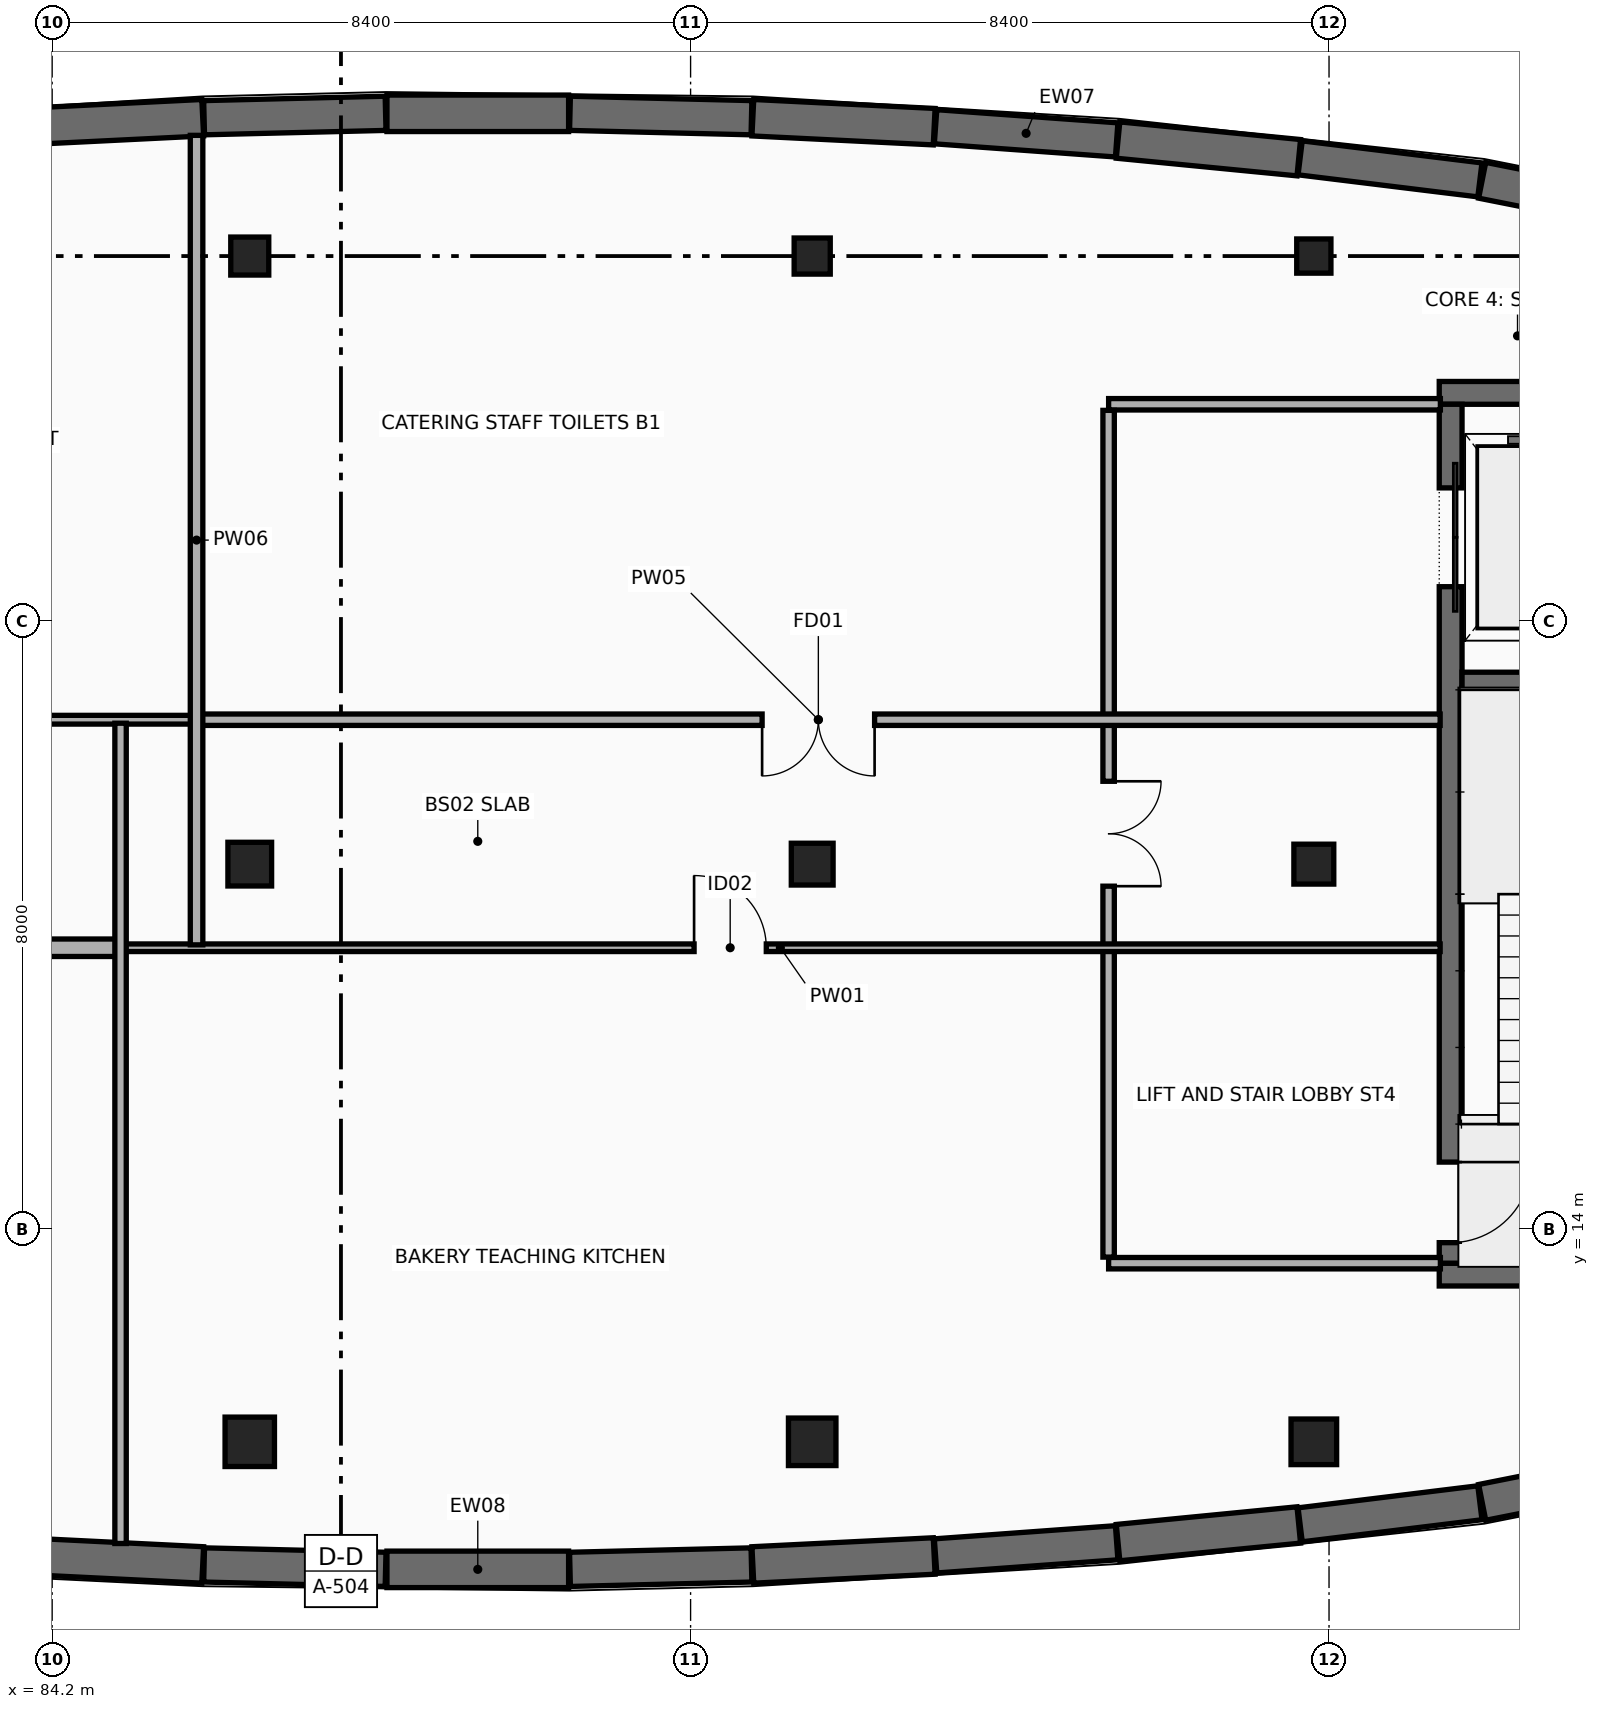
"""IFC4 building model, lengths in metres.
Left out: names, types, materials, properties, quantities, classifications, styles, units other than length and angle.
Written with IfcOpenShell. Run it as: python <this file> out.ifc"""

import sys

from ifc_helpers import new_model, si_unit, direction, frame, frame_2d, origin, origin_2d, place, context, subcontext, project, spatial, rectangle, extrude, element, fill, save


model = new_model("IFC4")
c1 = context("Model", 3, precision=1e-05, world=origin(), true_north=direction((0.0, 1.0)))
c2 = subcontext(c1, "Body", "Model", "MODEL_VIEW")
j1 = project(units=[si_unit("LENGTHUNIT", "METRE"), si_unit("PLANEANGLEUNIT", "RADIAN")], contexts=[c1])
p1 = place(None, origin())
s1 = spatial("IfcSite", under=j1, at=p1, CompositionType="ELEMENT")
p2 = place(p1, origin())
s2 = spatial("IfcBuilding", under=s1, at=p2, CompositionType="ELEMENT")
p3 = place(p2, frame((0.0, 0.0, -4.2)))
s3 = spatial("IfcBuildingStorey", under=s2, at=p3, CompositionType="ELEMENT", Elevation=-4.2)
p4 = place(p3, frame((102.45, 13.4, -0.415), z_axis=(0.0, 0.0, 1.0), x_axis=(1.0, 0.0, 0.0)))
e1 = element("IfcWall", 1, at=p4, inside=s3, PredefinedType="SHEAR", context=c2, shape_type="SweptSolid", body=[
    extrude(rectangle(XDim=5.091, YDim=0.3, at=frame_2d((2.545, 0.0))), origin(), (0.0, 0.0, 1.0), 4.615),
])
p5 = place(p3, frame((107.407, 25.0, -0.415), z_axis=(0.0, 0.0, 1.0), x_axis=(-1.0, 0.0, 0.0)))
e2 = element("IfcWall", 2, at=p5, inside=s3, PredefinedType="SHEAR", context=c2, shape_type="SweptSolid", body=[
    extrude(rectangle(XDim=4.957, YDim=0.3, at=frame_2d((2.479, 0.0))), origin(), (0.0, 0.0, 1.0), 4.615),
])
p6 = place(p3, frame((102.6, 24.85, -0.415), z_axis=(0.0, 0.0, 1.0), x_axis=(0.0, -1.0, 0.0)))
e3 = element("IfcWall", 3, at=p6, inside=s3, PredefinedType="SHEAR", context=c2, shape_type="SweptSolid", body=[
    extrude(rectangle(XDim=11.3, YDim=0.3, at=frame_2d((5.65, 0.0))), origin(), (0.0, 0.0, 1.0), 4.615),
])
p7 = place(p6, frame((1.1, 0.0, 0.415)))
e4 = element("IfcOpeningElement", 4, at=p7, cuts=e3, PredefinedType="OPENING", context=c2, shape_type="SweptSolid", body=[
    extrude(rectangle(XDim=1.3, YDim=2.25, at=frame_2d((0.65, 1.125))), frame((0.0, 0.16, 0.0), z_axis=(0.0, -1.0, 0.0), x_axis=(1.0, 0.0, 0.0)), (0.0, 0.0, 1.0), 0.32),
])
p8 = place(p6, frame((9.97, 0.0, 0.415)))
e5 = element("IfcOpeningElement", 5, at=p8, cuts=e3, PredefinedType="OPENING", context=c2, shape_type="SweptSolid", body=[
    extrude(rectangle(XDim=1.06, YDim=2.15, at=frame_2d((0.53, 1.075))), frame((0.0, 0.16, 0.0), z_axis=(0.0, -1.0, 0.0), x_axis=(1.0, 0.0, 0.0)), (0.0, 0.0, 1.0), 0.32),
])
p9 = place(p3, frame((102.75, 21.2, -0.415), z_axis=(0.0, 0.0, 1.0), x_axis=(1.0, 0.0, 0.0)))
e6 = element("IfcWall", 6, at=p9, inside=s3, PredefinedType="SHEAR", context=c2, shape_type="SweptSolid", body=[
    extrude(rectangle(XDim=4.1, YDim=0.25, at=frame_2d((2.05, 0.0))), origin(), (0.0, 0.0, 1.0), 4.615),
])
p10 = place(p3, frame((86.8, 11.2, -0.415), z_axis=(0.0, 0.0, 1.0), x_axis=(1.0, 0.0, 0.0)))
e7 = element("IfcColumn", 7, at=p10, inside=s3, PredefinedType="COLUMN", context=c2, shape_type="SweptSolid", body=[
    extrude(rectangle(XDim=0.65, YDim=0.65, at=origin_2d()), origin(), (0.0, 0.0, 1.0), 4.615),
])
p11 = place(p3, frame((86.8, 18.8, -0.415), z_axis=(0.0, 0.0, 1.0), x_axis=(1.0, 0.0, 0.0)))
e8 = element("IfcColumn", 8, at=p11, inside=s3, PredefinedType="COLUMN", context=c2, shape_type="SweptSolid", body=[
    extrude(rectangle(XDim=0.575, YDim=0.575, at=origin_2d()), origin(), (0.0, 0.0, 1.0), 4.615),
])
p12 = place(p3, frame((86.8, 26.8, -0.415), z_axis=(0.0, 0.0, 1.0), x_axis=(1.0, 0.0, 0.0)))
e9 = element("IfcColumn", 9, at=p12, inside=s3, PredefinedType="COLUMN", context=c2, shape_type="SweptSolid", body=[
    extrude(rectangle(XDim=0.5, YDim=0.5, at=origin_2d()), origin(), (0.0, 0.0, 1.0), 4.615),
])
p13 = place(p3, frame((94.2, 11.2, -0.415), z_axis=(0.0, 0.0, 1.0), x_axis=(1.0, 0.0, 0.0)))
e10 = element("IfcColumn", 10, at=p13, inside=s3, PredefinedType="COLUMN", context=c2, shape_type="SweptSolid", body=[
    extrude(rectangle(XDim=0.625, YDim=0.625, at=origin_2d()), origin(), (0.0, 0.0, 1.0), 4.615),
])
p14 = place(p3, frame((94.2, 18.8, -0.415), z_axis=(0.0, 0.0, 1.0), x_axis=(1.0, 0.0, 0.0)))
e11 = element("IfcColumn", 11, at=p14, inside=s3, PredefinedType="COLUMN", context=c2, shape_type="SweptSolid", body=[
    extrude(rectangle(XDim=0.55, YDim=0.55, at=origin_2d()), origin(), (0.0, 0.0, 1.0), 4.615),
])
p15 = place(p3, frame((94.2, 26.8, -0.415), z_axis=(0.0, 0.0, 1.0), x_axis=(1.0, 0.0, 0.0)))
e12 = element("IfcColumn", 12, at=p15, inside=s3, PredefinedType="COLUMN", context=c2, shape_type="SweptSolid", body=[
    extrude(rectangle(XDim=0.475, YDim=0.475, at=origin_2d()), origin(), (0.0, 0.0, 1.0), 4.615),
])
p16 = place(p3, frame((100.8, 11.2, -0.415), z_axis=(0.0, 0.0, 1.0), x_axis=(1.0, 0.0, 0.0)))
e13 = element("IfcColumn", 13, at=p16, inside=s3, PredefinedType="COLUMN", context=c2, shape_type="SweptSolid", body=[
    extrude(rectangle(XDim=0.6, YDim=0.6, at=origin_2d()), origin(), (0.0, 0.0, 1.0), 4.615),
])
p17 = place(p3, frame((100.8, 18.8, -0.415), z_axis=(0.0, 0.0, 1.0), x_axis=(1.0, 0.0, 0.0)))
e14 = element("IfcColumn", 14, at=p17, inside=s3, PredefinedType="COLUMN", context=c2, shape_type="SweptSolid", body=[
    extrude(rectangle(XDim=0.525, YDim=0.525, at=origin_2d()), origin(), (0.0, 0.0, 1.0), 4.615),
])
p18 = place(p3, frame((100.8, 26.8, -0.415), z_axis=(0.0, 0.0, 1.0), x_axis=(1.0, 0.0, 0.0)))
e15 = element("IfcColumn", 15, at=p18, inside=s3, PredefinedType="COLUMN", context=c2, shape_type="SweptSolid", body=[
    extrude(rectangle(XDim=0.45, YDim=0.45, at=origin_2d()), origin(), (0.0, 0.0, 1.0), 4.615),
])
p19 = place(p3, frame((86.181, 9.58, 0.0), z_axis=(0.0, 0.0, 1.0), x_axis=(-0.99878097173, 0.049361629934, 0.0)))
e16 = element("IfcWall", 16, at=p19, inside=s3, PredefinedType="STANDARD", context=c2, shape_type="SweptSolid", body=[
    extrude(rectangle(XDim=2.389, YDim=0.48, at=frame_2d((1.194, 0.0))), origin(), (0.0, 0.0, 1.0), 3.897),
])
p20 = place(p3, frame((88.587, 9.522, 0.0), z_axis=(0.0, 0.0, 1.0), x_axis=(-0.999704086624, 0.02432568987, 0.0)))
e17 = element("IfcWall", 17, at=p20, inside=s3, PredefinedType="STANDARD", context=c2, shape_type="SweptSolid", body=[
    extrude(rectangle(XDim=2.389, YDim=0.45, at=frame_2d((1.194, 0.0))), origin(), (0.0, 0.0, 1.0), 3.897),
])
p21 = place(p3, frame((90.995, 9.522, 0.0), z_axis=(0.0, 0.0, 1.0), x_axis=(-1.0, 0.0, 0.0)))
e18 = element("IfcWall", 18, at=p21, inside=s3, PredefinedType="STANDARD", context=c2, shape_type="SweptSolid", body=[
    extrude(rectangle(XDim=2.39, YDim=0.48, at=frame_2d((1.195, 0.0))), origin(), (0.0, 0.0, 1.0), 3.897),
])
p22 = place(p3, frame((93.401, 9.58, 0.0), z_axis=(0.0, 0.0, 1.0), x_axis=(-0.999704086624, -0.02432568987, 0.0)))
e19 = element("IfcWall", 19, at=p22, inside=s3, PredefinedType="STANDARD", context=c2, shape_type="SweptSolid", body=[
    extrude(rectangle(XDim=2.389, YDim=0.45, at=frame_2d((1.194, 0.0))), origin(), (0.0, 0.0, 1.0), 3.897),
])
p23 = place(p3, frame((95.805, 9.698, 0.0), z_axis=(0.0, 0.0, 1.0), x_axis=(-0.99878097173, -0.049361629934, 0.0)))
e20 = element("IfcWall", 20, at=p23, inside=s3, PredefinedType="STANDARD", context=c2, shape_type="SweptSolid", body=[
    extrude(rectangle(XDim=2.389, YDim=0.48, at=frame_2d((1.194, 0.0))), origin(), (0.0, 0.0, 1.0), 3.897),
])
p24 = place(p3, frame((98.206, 9.872, 0.0), z_axis=(0.0, 0.0, 1.0), x_axis=(-0.997372398559, -0.07244514195, 0.0)))
e21 = element("IfcWall", 21, at=p24, inside=s3, PredefinedType="STANDARD", context=c2, shape_type="SweptSolid", body=[
    extrude(rectangle(XDim=2.389, YDim=0.45, at=frame_2d((1.195, 0.0))), origin(), (0.0, 0.0, 1.0), 3.897),
])
p25 = place(p3, frame((100.602, 10.106, 0.0), z_axis=(0.0, 0.0, 1.0), x_axis=(-0.995277042211, -0.097075276191, 0.0)))
e22 = element("IfcWall", 22, at=p25, inside=s3, PredefinedType="STANDARD", context=c2, shape_type="SweptSolid", body=[
    extrude(rectangle(XDim=2.389, YDim=0.48, at=frame_2d((1.195, 0.0))), origin(), (0.0, 0.0, 1.0), 3.897),
])
p26 = place(p3, frame((102.985, 10.398, 0.0), z_axis=(0.0, 0.0, 1.0), x_axis=(-0.99256366712, -0.121726606435, 0.0)))
e23 = element("IfcWall", 23, at=p26, inside=s3, PredefinedType="STANDARD", context=c2, shape_type="SweptSolid", body=[
    extrude(rectangle(XDim=2.383, YDim=0.45, at=frame_2d((1.191, 0.0))), origin(), (0.0, 0.0, 1.0), 3.897),
])
for number, where, z_axis, x_axis in (
    (24, (105.013, 10.8, 0.0), (0.0, 0.0, 1.0), (-0.981, -0.195, 0.0)),
    (25, (103.015, 27.797, 0.0), (0.0, 0.0, 1.0), (0.981, -0.195, 0.0)),
):
    element("IfcWall", number, at=place(p3, frame(where, z_axis=z_axis, x_axis=x_axis)), inside=s3, PredefinedType="STANDARD", context=c2, shape_type="SweptSolid", body=[
        extrude(rectangle(XDim=2.037, YDim=0.48, at=frame_2d((1.019, 0.0))), origin(), (0.0, 0.0, 1.0), 3.897),
    ])
p27 = place(p3, frame((100.62, 28.092, 0.0), z_axis=(0.0, 0.0, 1.0), x_axis=(0.99256366712, -0.121726606435, 0.0)))
e26 = element("IfcWall", 26, at=p27, inside=s3, PredefinedType="STANDARD", context=c2, shape_type="SweptSolid", body=[
    extrude(rectangle(XDim=2.383, YDim=0.45, at=frame_2d((1.191, 0.0))), origin(), (0.0, 0.0, 1.0), 3.897),
])
p28 = place(p3, frame((98.224, 28.326, 0.0), z_axis=(0.0, 0.0, 1.0), x_axis=(0.995277042211, -0.097075276191, 0.0)))
e27 = element("IfcWall", 27, at=p28, inside=s3, PredefinedType="STANDARD", context=c2, shape_type="SweptSolid", body=[
    extrude(rectangle(XDim=2.389, YDim=0.48, at=frame_2d((1.195, 0.0))), origin(), (0.0, 0.0, 1.0), 3.897),
])
p29 = place(p3, frame((95.823, 28.501, 0.0), z_axis=(0.0, 0.0, 1.0), x_axis=(0.997372398559, -0.07244514195, 0.0)))
e28 = element("IfcWall", 28, at=p29, inside=s3, PredefinedType="STANDARD", context=c2, shape_type="SweptSolid", body=[
    extrude(rectangle(XDim=2.389, YDim=0.45, at=frame_2d((1.195, 0.0))), origin(), (0.0, 0.0, 1.0), 3.897),
])
p30 = place(p3, frame((93.419, 28.62, 0.0), z_axis=(0.0, 0.0, 1.0), x_axis=(0.998775928043, -0.049463578141, 0.0)))
e29 = element("IfcWall", 29, at=p30, inside=s3, PredefinedType="STANDARD", context=c2, shape_type="SweptSolid", body=[
    extrude(rectangle(XDim=2.389, YDim=0.48, at=frame_2d((1.194, 0.0))), origin(), (0.0, 0.0, 1.0), 3.897),
])
p31 = place(p3, frame((91.013, 28.678, 0.0), z_axis=(0.0, 0.0, 1.0), x_axis=(0.999706566975, -0.024223541189, 0.0)))
e30 = element("IfcWall", 30, at=p31, inside=s3, PredefinedType="STANDARD", context=c2, shape_type="SweptSolid", body=[
    extrude(rectangle(XDim=2.389, YDim=0.45, at=frame_2d((1.194, 0.0))), origin(), (0.0, 0.0, 1.0), 3.897),
])
p32 = place(p3, frame((88.605, 28.678, 0.0), z_axis=(0.0, 0.0, 1.0), x_axis=(1.0, 0.0, 0.0)))
e31 = element("IfcWall", 31, at=p32, inside=s3, PredefinedType="STANDARD", context=c2, shape_type="SweptSolid", body=[
    extrude(rectangle(XDim=2.39, YDim=0.48, at=frame_2d((1.195, 0.0))), origin(), (0.0, 0.0, 1.0), 3.897),
])
p33 = place(p3, frame((86.199, 28.62, 0.0), z_axis=(0.0, 0.0, 1.0), x_axis=(0.999706566975, 0.024223541189, 0.0)))
e32 = element("IfcWall", 32, at=p33, inside=s3, PredefinedType="STANDARD", context=c2, shape_type="SweptSolid", body=[
    extrude(rectangle(XDim=2.389, YDim=0.45, at=frame_2d((1.194, 0.0))), origin(), (0.0, 0.0, 1.0), 3.897),
])
p34 = place(p3, frame((83.795, 28.502, 0.0), z_axis=(0.0, 0.0, 1.0), x_axis=(0.998775928043, 0.049463578141, 0.0)))
e33 = element("IfcWall", 33, at=p34, inside=s3, PredefinedType="STANDARD", context=c2, shape_type="SweptSolid", body=[
    extrude(rectangle(XDim=2.389, YDim=0.48, at=frame_2d((1.194, 0.0))), origin(), (0.0, 0.0, 1.0), 3.897),
])
p35 = place(p3, frame((98.1, 13.55, 0.0), z_axis=(0.0, 0.0, 1.0), x_axis=(1.0, 0.0, 0.0)))
e34 = element("IfcWall", 34, at=p35, inside=s3, PredefinedType="PARTITIONING", context=c2, shape_type="SweptSolid", body=[
    extrude(rectangle(XDim=4.365, YDim=0.15, at=frame_2d((2.183, 0.0))), origin(), (0.0, 0.0, 1.0), 3.285),
])
p36 = place(p3, frame((102.465, 24.85, 0.0), z_axis=(0.0, 0.0, 1.0), x_axis=(-1.0, 0.0, 0.0)))
e35 = element("IfcWall", 35, at=p36, inside=s3, PredefinedType="PARTITIONING", context=c2, shape_type="SweptSolid", body=[
    extrude(rectangle(XDim=4.365, YDim=0.15, at=frame_2d((2.183, 0.0))), origin(), (0.0, 0.0, 1.0), 3.235),
])
p37 = place(p3, frame((98.1, 24.77, 0.0), z_axis=(0.0, 0.0, 1.0), x_axis=(0.0, -1.0, 0.0)))
e36 = element("IfcWall", 36, at=p37, inside=s3, PredefinedType="PARTITIONING", context=c2, shape_type="SweptSolid", body=[
    extrude(rectangle(XDim=11.14, YDim=0.15, at=frame_2d((5.57, 0.0))), origin(), (0.0, 0.0, 1.0), 3.472),
])
p38 = place(p37, frame((4.88, 0.0, 0.0)))
e37 = element("IfcOpeningElement", 37, at=p38, cuts=e36, PredefinedType="OPENING", context=c2, shape_type="SweptSolid", body=[
    extrude(rectangle(XDim=1.38, YDim=2.2, at=frame_2d((0.69, 1.1))), frame((0.0, 0.085, 0.0), z_axis=(0.0, -1.0, 0.0), x_axis=(1.0, 0.0, 0.0)), (0.0, 0.0, 1.0), 0.17),
])
p39 = place(p3, frame((71.386, 17.7, 0.0), z_axis=(0.0, 0.0, 1.0), x_axis=(1.0, 0.0, 0.0)))
e38 = element("IfcWall", 38, at=p39, inside=s3, PredefinedType="PARTITIONING", context=c2, shape_type="SweptSolid", body=[
    extrude(rectangle(XDim=13.714, YDim=0.23, at=frame_2d((6.857, 0.0))), origin(), (0.0, 0.0, 1.0), 3.36),
])
p40 = place(p39, frame((6.387, 0.0, 0.0)))
e39 = element("IfcOpeningElement", 39, at=p40, cuts=e38, PredefinedType="OPENING", context=c2, shape_type="SweptSolid", body=[
    extrude(rectangle(XDim=0.94, YDim=2.1, at=frame_2d((0.47, 1.05))), frame((0.0, 0.125, 0.0), z_axis=(0.0, -1.0, 0.0), x_axis=(1.0, 0.0, 0.0)), (0.0, 0.0, 1.0), 0.25),
])
p41 = place(p3, frame((85.1, 17.7, 0.0), z_axis=(0.0, 0.0, 1.0), x_axis=(1.0, 0.0, 0.0)))
e40 = element("IfcWall", 40, at=p41, inside=s3, PredefinedType="PARTITIONING", context=c2, shape_type="SweptSolid", body=[
    extrude(rectangle(XDim=17.362, YDim=0.1, at=frame_2d((8.681, 0.0))), origin(), (0.0, 0.0, 1.0), 3.285),
])
p42 = place(p41, frame((7.546, 0.0, 0.0)))
e41 = element("IfcOpeningElement", 41, at=p42, cuts=e40, PredefinedType="OPENING", context=c2, shape_type="SweptSolid", body=[
    extrude(rectangle(XDim=0.95, YDim=2.11, at=frame_2d((0.475, 1.055))), frame((0.0, 0.06, 0.0), z_axis=(0.0, -1.0, 0.0), x_axis=(1.0, 0.0, 0.0)), (0.0, 0.0, 1.0), 0.12),
])
p43 = place(p3, frame((86.1, 20.7, 0.0), z_axis=(0.0, 0.0, 1.0), x_axis=(-1.0, 0.0, 0.0)))
e42 = element("IfcWall", 42, at=p43, inside=s3, PredefinedType="PARTITIONING", context=c2, shape_type="SweptSolid", body=[
    extrude(rectangle(XDim=14.709, YDim=0.115, at=frame_2d((7.354, 0.0))), origin(), (0.0, 0.0, 1.0), 3.335),
])
p44 = place(p43, frame((6.664, 0.0, 0.0)))
e43 = element("IfcOpeningElement", 43, at=p44, cuts=e42, PredefinedType="OPENING", context=c2, shape_type="SweptSolid", body=[
    extrude(rectangle(XDim=1.38, YDim=2.2, at=frame_2d((0.69, 1.1))), frame((0.0, 0.067, 0.0), z_axis=(0.0, -1.0, 0.0), x_axis=(1.0, 0.0, 0.0)), (0.0, 0.0, 1.0), 0.135),
])
p45 = place(p3, frame((102.462, 20.7, 0.0), z_axis=(0.0, 0.0, 1.0), x_axis=(-1.0, 0.0, 0.0)))
e44 = element("IfcWall", 44, at=p45, inside=s3, PredefinedType="PARTITIONING", context=c2, shape_type="SweptSolid", body=[
    extrude(rectangle(XDim=16.362, YDim=0.15, at=frame_2d((8.181, 0.0))), origin(), (0.0, 0.0, 1.0), 3.235),
])
p46 = place(p45, frame((7.441, 0.0, 0.0)))
e45 = element("IfcOpeningElement", 45, at=p46, cuts=e44, PredefinedType="OPENING", context=c2, shape_type="SweptSolid", body=[
    extrude(rectangle(XDim=1.48, YDim=2.22, at=frame_2d((0.74, 1.11))), frame((0.0, 0.085, 0.0), z_axis=(0.0, -1.0, 0.0), x_axis=(1.0, 0.0, 0.0)), (0.0, 0.0, 1.0), 0.17),
])
p47 = place(p3, frame((85.1, 9.862, 0.0), z_axis=(0.0, 0.0, 1.0), x_axis=(0.0, 1.0, 0.0)))
e46 = element("IfcWall", 46, at=p47, inside=s3, PredefinedType="PARTITIONING", context=c2, shape_type="SweptSolid", body=[
    extrude(rectangle(XDim=10.792, YDim=0.15, at=frame_2d((5.396, 0.0))), origin(), (0.0, 0.0, 1.0), 3.479),
])
p48 = place(p3, frame((86.1, 17.738, 0.0), z_axis=(0.0, 0.0, 1.0), x_axis=(0.0, 1.0, 0.0)))
e47 = element("IfcWall", 47, at=p48, inside=s3, PredefinedType="PARTITIONING", context=c2, shape_type="SweptSolid", body=[
    extrude(rectangle(XDim=10.65, YDim=0.165, at=frame_2d((5.325, 0.0))), origin(), (0.0, 0.0, 1.0), 3.476),
])
p49 = place(p7, origin())
e48 = element("IfcDoor", 48, at=p49, inside=s3, OperationType="DOUBLE_DOOR_SLIDING", PredefinedType="DOOR", context=c2, shape_type="SweptSolid", body=[
    extrude(rectangle(XDim=1.3, YDim=2.25, at=frame_2d((0.65, 1.125))), frame((0.0, 0.025, 0.0), z_axis=(0.0, -1.0, 0.0), x_axis=(1.0, 0.0, 0.0)), (0.0, 0.0, 1.0), 0.05),
])
fill(e4, e48)
p50 = place(p8, origin())
e49 = element("IfcDoor", 49, at=p50, inside=s3, OperationType="SINGLE_SWING_LEFT", PredefinedType="DOOR", context=c2, shape_type="SweptSolid", body=[
    extrude(rectangle(XDim=1.06, YDim=2.15, at=frame_2d((0.53, 1.075))), frame((0.0, 0.025, 0.0), z_axis=(0.0, -1.0, 0.0), x_axis=(1.0, 0.0, 0.0)), (0.0, 0.0, 1.0), 0.05),
])
fill(e5, e49)
p51 = place(p38, origin())
e50 = element("IfcDoor", 50, at=p51, inside=s3, OperationType="DOUBLE_DOOR_SINGLE_SWING", PredefinedType="DOOR", context=c2, shape_type="SweptSolid", body=[
    extrude(rectangle(XDim=1.38, YDim=2.2, at=frame_2d((0.69, 1.1))), frame((0.0, 0.025, 0.0), z_axis=(0.0, -1.0, 0.0), x_axis=(1.0, 0.0, 0.0)), (0.0, 0.0, 1.0), 0.05),
])
fill(e37, e50)
p52 = place(p42, origin())
e51 = element("IfcDoor", 51, at=p52, inside=s3, OperationType="SINGLE_SWING_LEFT", PredefinedType="DOOR", context=c2, shape_type="SweptSolid", body=[
    extrude(rectangle(XDim=0.95, YDim=2.11, at=frame_2d((0.475, 1.055))), frame((0.0, 0.025, 0.0), z_axis=(0.0, -1.0, 0.0), x_axis=(1.0, 0.0, 0.0)), (0.0, 0.0, 1.0), 0.05),
])
fill(e41, e51)
p53 = place(p46, origin())
e52 = element("IfcDoor", 52, at=p53, inside=s3, OperationType="DOUBLE_DOOR_SINGLE_SWING", PredefinedType="DOOR", context=c2, shape_type="SweptSolid", body=[
    extrude(rectangle(XDim=1.48, YDim=2.22, at=frame_2d((0.74, 1.11))), frame((0.0, 0.025, 0.0), z_axis=(0.0, -1.0, 0.0), x_axis=(1.0, 0.0, 0.0)), (0.0, 0.0, 1.0), 0.05),
])
fill(e45, e52)
save(model, sys.argv[1])
